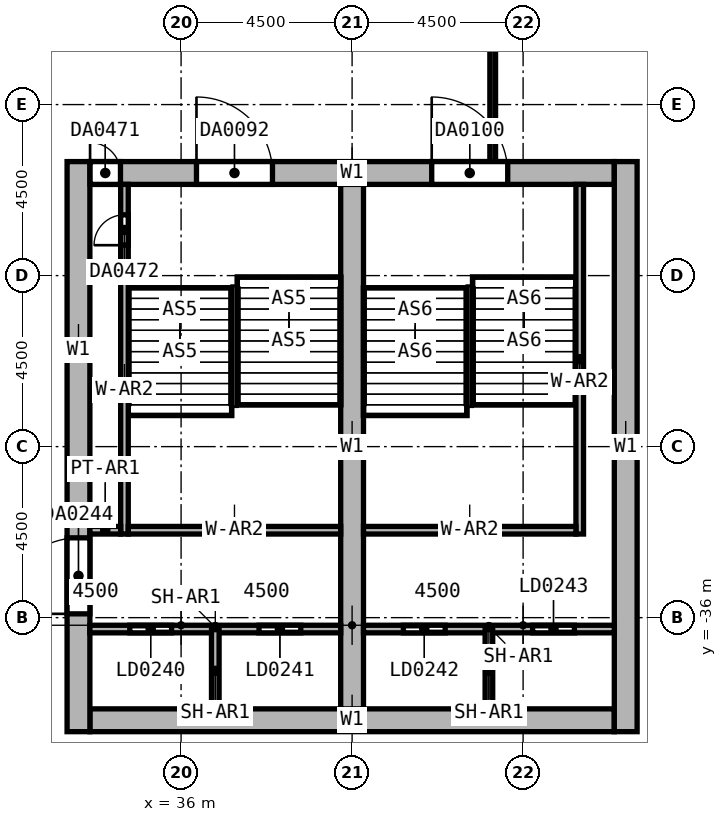
"""IFC4 building model, lengths in metres.
Left out: names, types, materials, properties, quantities, classifications, styles, units other than length and angle.
Written with IfcOpenShell. Run it as: python <this file> out.ifc"""

import sys

from ifc_helpers import new_model, si_unit, direction, frame, frame_2d, origin, place, context, subcontext, project, spatial, rectangle, extrude, element, fill, save


model = new_model("IFC4")
c1 = context("Model", 3, precision=1e-05, world=origin(), true_north=direction((0.0, 1.0)))
c2 = subcontext(c1, "Body", "Model", "MODEL_VIEW")
j1 = project(units=[si_unit("LENGTHUNIT", "METRE"), si_unit("PLANEANGLEUNIT", "RADIAN")], contexts=[c1])
p1 = place(None, origin())
s1 = spatial("IfcSite", under=j1, at=p1, CompositionType="ELEMENT")
p2 = place(p1, origin())
s2 = spatial("IfcBuilding", under=s1, at=p2, CompositionType="ELEMENT")
p3 = place(p2, frame((0.0, 0.0, 52.0)))
s3 = spatial("IfcBuildingStorey", under=s2, at=p3, CompositionType="ELEMENT", Elevation=52.0)
p4 = place(p3, frame((33.6, -24.3, 0.0), z_axis=(0.0, 0.0, 1.0), x_axis=(1.0, 0.0, 0.0)))
e1 = element("IfcWall", 1, at=p4, inside=s3, PredefinedType="SHEAR", context=c2, shape_type="SweptSolid", body=[
    extrude(rectangle(XDim=13.8, YDim=0.6, at=frame_2d((6.9, 0.0))), origin(), (0.0, 0.0, 1.0), 8.0),
])
p5 = place(p4, frame((2.805, 0.0, 0.0)))
e2 = element("IfcOpeningElement", 2, at=p5, cuts=e1, PredefinedType="OPENING", context=c2, shape_type="SweptSolid", body=[
    extrude(rectangle(XDim=2.0, YDim=2.4, at=frame_2d((1.0, 1.2))), frame((0.0, 0.3, 0.0), z_axis=(0.0, -1.0, 0.0), x_axis=(1.0, 0.0, 0.0)), (0.0, 0.0, 1.0), 0.6),
])
p6 = place(p4, frame((8.995, 0.0, 0.0)))
e3 = element("IfcOpeningElement", 3, at=p6, cuts=e1, PredefinedType="OPENING", context=c2, shape_type="SweptSolid", body=[
    extrude(rectangle(XDim=2.0, YDim=2.4, at=frame_2d((1.0, 1.2))), frame((0.0, 0.3, 0.0), z_axis=(0.0, -1.0, 0.0), x_axis=(1.0, 0.0, 0.0)), (0.0, 0.0, 1.0), 0.6),
])
p7 = place(p4, frame((0.005, 0.0, 0.0)))
e4 = element("IfcOpeningElement", 4, at=p7, cuts=e1, PredefinedType="OPENING", context=c2, shape_type="SweptSolid", body=[
    extrude(rectangle(XDim=0.8, YDim=2.1, at=frame_2d((0.4, 1.05))), frame((0.0, 0.3, 0.0), z_axis=(0.0, -1.0, 0.0), x_axis=(1.0, 0.0, 0.0)), (0.0, 0.0, 1.0), 0.6),
])
p8 = place(p3, frame((33.6, -38.7, 0.0), z_axis=(0.0, 0.0, 1.0), x_axis=(1.0, 0.0, 0.0)))
e5 = element("IfcWall", 5, at=p8, inside=s3, PredefinedType="SHEAR", context=c2, shape_type="SweptSolid", body=[
    extrude(rectangle(XDim=13.8, YDim=0.6, at=frame_2d((6.9, 0.0))), origin(), (0.0, 0.0, 1.0), 8.0),
])
p9 = place(p3, frame((33.3, -39.0, 0.0), z_axis=(0.0, 0.0, 1.0), x_axis=(0.0, 1.0, 0.0)))
e6 = element("IfcWall", 6, at=p9, inside=s3, PredefinedType="SHEAR", context=c2, shape_type="SweptSolid", body=[
    extrude(rectangle(XDim=15.0, YDim=0.6, at=frame_2d((7.5, 0.0))), origin(), (0.0, 0.0, 1.0), 8.0),
])
p10 = place(p9, frame((3.1, 0.0, 0.0)))
e7 = element("IfcOpeningElement", 7, at=p10, cuts=e6, PredefinedType="OPENING", context=c2, shape_type="SweptSolid", body=[
    extrude(rectangle(XDim=2.0, YDim=2.4, at=frame_2d((1.0, 1.2))), frame((0.0, 0.3, 0.0), z_axis=(0.0, -1.0, 0.0), x_axis=(1.0, 0.0, 0.0)), (0.0, 0.0, 1.0), 0.6),
])
p11 = place(p3, frame((47.7, -39.0, 0.0), z_axis=(0.0, 0.0, 1.0), x_axis=(0.0, 1.0, 0.0)))
e8 = element("IfcWall", 8, at=p11, inside=s3, PredefinedType="SHEAR", context=c2, shape_type="SweptSolid", body=[
    extrude(rectangle(XDim=15.0, YDim=0.6, at=frame_2d((7.5, 0.0))), origin(), (0.0, 0.0, 1.0), 8.0),
])
p12 = place(p3, frame((40.5, -38.4, 0.0), z_axis=(0.0, 0.0, 1.0), x_axis=(0.0, 1.0, 0.0)))
e9 = element("IfcWall", 9, at=p12, inside=s3, PredefinedType="SHEAR", context=c2, shape_type="SweptSolid", body=[
    extrude(rectangle(XDim=13.8, YDim=0.6, at=frame_2d((6.9, 0.0))), origin(), (0.0, 0.0, 1.0), 8.0),
])
p13 = place(p3, frame((34.51, -33.8, 0.0), z_axis=(0.0, 0.0, 1.0), x_axis=(0.0, 1.0, 0.0)))
e10 = element("IfcWall", 10, at=p13, inside=s3, PredefinedType="SOLIDWALL", context=c2, shape_type="SweptSolid", body=[
    extrude(rectangle(XDim=9.2, YDim=0.2, at=frame_2d((4.6, 0.0))), origin(), (0.0, 0.0, 1.0), 8.0),
])
p14 = place(p13, frame((7.6, 0.0, 0.0)))
e11 = element("IfcOpeningElement", 11, at=p14, cuts=e10, PredefinedType="OPENING", context=c2, shape_type="SweptSolid", body=[
    extrude(rectangle(XDim=0.8, YDim=2.1, at=frame_2d((0.4, 1.05))), frame((0.0, 0.1, 0.0), z_axis=(0.0, -1.0, 0.0), x_axis=(1.0, 0.0, 0.0)), (0.0, 0.0, 1.0), 0.2),
])
p15 = place(p3, frame((34.61, -33.7, 0.0), z_axis=(0.0, 0.0, 1.0), x_axis=(1.0, 0.0, 0.0)))
e12 = element("IfcWall", 12, at=p15, inside=s3, PredefinedType="SOLIDWALL", context=c2, shape_type="SweptSolid", body=[
    extrude(rectangle(XDim=5.59, YDim=0.2, at=frame_2d((2.795, 0.0))), origin(), (0.0, 0.0, 1.0), 8.0),
])
p16 = place(p3, frame((46.49, -33.8, 0.0), z_axis=(0.0, 0.0, 1.0), x_axis=(0.0, 1.0, 0.0)))
e13 = element("IfcWall", 13, at=p16, inside=s3, PredefinedType="SOLIDWALL", context=c2, shape_type="SweptSolid", body=[
    extrude(rectangle(XDim=9.2, YDim=0.2, at=frame_2d((4.6, 0.0))), origin(), (0.0, 0.0, 1.0), 8.0),
])
p17 = place(p3, frame((40.8, -33.7, 0.0), z_axis=(0.0, 0.0, 1.0), x_axis=(1.0, 0.0, 0.0)))
e14 = element("IfcWall", 14, at=p17, inside=s3, PredefinedType="SOLIDWALL", context=c2, shape_type="SweptSolid", body=[
    extrude(rectangle(XDim=5.59, YDim=0.2, at=frame_2d((2.795, 0.0))), origin(), (0.0, 0.0, 1.0), 8.0),
])
p18 = place(p3, frame((33.6, -36.3, 0.0), z_axis=(0.0, 0.0, 1.0), x_axis=(1.0, 0.0, 0.0)))
e15 = element("IfcWall", 15, at=p18, inside=s3, PredefinedType="SHEAR", context=c2, shape_type="SweptSolid", body=[
    extrude(rectangle(XDim=6.6, YDim=0.2, at=frame_2d((3.3, 0.0))), origin(), (0.0, 0.0, 1.0), 8.0),
])
p19 = place(p18, frame((1.05, 0.0, 0.0)))
e16 = element("IfcOpeningElement", 16, at=p19, cuts=e15, PredefinedType="OPENING", context=c2, shape_type="SweptSolid", body=[
    extrude(rectangle(XDim=1.1, YDim=2.4, at=frame_2d((0.55, 1.2))), frame((0.0, 0.1, 0.0), z_axis=(0.0, -1.0, 0.0), x_axis=(1.0, 0.0, 0.0)), (0.0, 0.0, 1.0), 0.2),
])
p20 = place(p18, frame((4.45, 0.0, 0.0)))
e17 = element("IfcOpeningElement", 17, at=p20, cuts=e15, PredefinedType="OPENING", context=c2, shape_type="SweptSolid", body=[
    extrude(rectangle(XDim=1.1, YDim=2.4, at=frame_2d((0.55, 1.2))), frame((0.0, 0.1, 0.0), z_axis=(0.0, -1.0, 0.0), x_axis=(1.0, 0.0, 0.0)), (0.0, 0.0, 1.0), 0.2),
])
p21 = place(p3, frame((40.8, -36.3, 0.0), z_axis=(0.0, 0.0, 1.0), x_axis=(1.0, 0.0, 0.0)))
e18 = element("IfcWall", 18, at=p21, inside=s3, PredefinedType="SHEAR", context=c2, shape_type="SweptSolid", body=[
    extrude(rectangle(XDim=6.6, YDim=0.2, at=frame_2d((3.3, 0.0))), origin(), (0.0, 0.0, 1.0), 8.0),
])
p22 = place(p21, frame((1.05, 0.0, 0.0)))
e19 = element("IfcOpeningElement", 19, at=p22, cuts=e18, PredefinedType="OPENING", context=c2, shape_type="SweptSolid", body=[
    extrude(rectangle(XDim=1.1, YDim=2.4, at=frame_2d((0.55, 1.2))), frame((0.0, 0.1, 0.0), z_axis=(0.0, -1.0, 0.0), x_axis=(1.0, 0.0, 0.0)), (0.0, 0.0, 1.0), 0.2),
])
p23 = place(p21, frame((4.45, 0.0, 0.0)))
e20 = element("IfcOpeningElement", 20, at=p23, cuts=e18, PredefinedType="OPENING", context=c2, shape_type="SweptSolid", body=[
    extrude(rectangle(XDim=1.1, YDim=2.4, at=frame_2d((0.55, 1.2))), frame((0.0, 0.1, 0.0), z_axis=(0.0, -1.0, 0.0), x_axis=(1.0, 0.0, 0.0)), (0.0, 0.0, 1.0), 0.2),
])
for number, where, z_axis, x_axis in (
    (21, (36.9, -38.4, 0.0), (0.0, 0.0, 1.0), (0.0, 1.0, 0.0)),
    (22, (44.1, -38.4, 0.0), (0.0, 0.0, 1.0), (0.0, 1.0, 0.0)),
):
    element("IfcWall", number, at=place(p3, frame(where, z_axis=z_axis, x_axis=x_axis)), inside=s3, PredefinedType="SHEAR", context=c2, shape_type="SweptSolid", body=[
        extrude(rectangle(XDim=2.1, YDim=0.2, at=frame_2d((1.05, 0.0))), origin(), (0.0, 0.0, 1.0), 8.0),
    ])
p24 = place(p3, frame((33.6, -33.7, 0.0), z_axis=(0.0, 0.0, 1.0), x_axis=(1.0, 0.0, 0.0)))
e23 = element("IfcWall", 23, at=p24, inside=s3, PredefinedType="PARTITIONING", context=c2, shape_type="SweptSolid", body=[
    extrude(rectangle(XDim=0.81, YDim=0.2, at=frame_2d((0.405, 0.0))), origin(), (0.0, 0.0, 1.0), 8.0),
])
p25 = place(p3, frame((44.2, -24.0, 0.0), z_axis=(0.0, 0.0, 1.0), x_axis=(0.0, 1.0, 0.0)))
e24 = element("IfcWall", 24, at=p25, inside=s3, PredefinedType="SOLIDWALL", context=c2, shape_type="SweptSolid", body=[
    extrude(rectangle(XDim=9.0, YDim=0.15, at=frame_2d((4.5, 0.0))), origin(), (0.0, 0.0, 1.0), 7.7),
])
p26 = place(p5, frame((2.0, 0.0, 0.0), z_axis=(0.0, 0.0, 1.0), x_axis=(-1.0, 0.0, 0.0)))
e25 = element("IfcDoor", 25, at=p26, inside=s3, OperationType="DOUBLE_DOOR_SINGLE_SWING", PredefinedType="DOOR", context=c2, shape_type="SweptSolid", body=[
    extrude(rectangle(XDim=2.0, YDim=2.4, at=frame_2d((1.0, 1.2))), frame((0.0, 0.025, 0.0), z_axis=(0.0, -1.0, 0.0), x_axis=(1.0, 0.0, 0.0)), (0.0, 0.0, 1.0), 0.05),
])
fill(e2, e25)
p27 = place(p6, frame((2.0, 0.0, 0.0), z_axis=(0.0, 0.0, 1.0), x_axis=(-1.0, 0.0, 0.0)))
e26 = element("IfcDoor", 26, at=p27, inside=s3, OperationType="DOUBLE_DOOR_SINGLE_SWING", PredefinedType="DOOR", context=c2, shape_type="SweptSolid", body=[
    extrude(rectangle(XDim=2.0, YDim=2.4, at=frame_2d((1.0, 1.2))), frame((0.0, 0.025, 0.0), z_axis=(0.0, -1.0, 0.0), x_axis=(1.0, 0.0, 0.0)), (0.0, 0.0, 1.0), 0.05),
])
fill(e3, e26)
p28 = place(p19, frame((1.1, 0.0, 0.0), z_axis=(0.0, 0.0, 1.0), x_axis=(-1.0, 0.0, 0.0)))
e27 = element("IfcDoor", 27, at=p28, inside=s3, OperationType="DOUBLE_DOOR_SLIDING", PredefinedType="DOOR", context=c2, shape_type="SweptSolid", body=[
    extrude(rectangle(XDim=1.1, YDim=2.4, at=frame_2d((0.55, 1.2))), frame((0.0, 0.025, 0.0), z_axis=(0.0, -1.0, 0.0), x_axis=(1.0, 0.0, 0.0)), (0.0, 0.0, 1.0), 0.05),
])
fill(e16, e27)
p29 = place(p20, frame((1.1, 0.0, 0.0), z_axis=(0.0, 0.0, 1.0), x_axis=(-1.0, 0.0, 0.0)))
e28 = element("IfcDoor", 28, at=p29, inside=s3, OperationType="DOUBLE_DOOR_SLIDING", PredefinedType="DOOR", context=c2, shape_type="SweptSolid", body=[
    extrude(rectangle(XDim=1.1, YDim=2.4, at=frame_2d((0.55, 1.2))), frame((0.0, 0.025, 0.0), z_axis=(0.0, -1.0, 0.0), x_axis=(1.0, 0.0, 0.0)), (0.0, 0.0, 1.0), 0.05),
])
fill(e17, e28)
p30 = place(p22, frame((1.1, 0.0, 0.0), z_axis=(0.0, 0.0, 1.0), x_axis=(-1.0, 0.0, 0.0)))
e29 = element("IfcDoor", 29, at=p30, inside=s3, OperationType="DOUBLE_DOOR_SLIDING", PredefinedType="DOOR", context=c2, shape_type="SweptSolid", body=[
    extrude(rectangle(XDim=1.1, YDim=2.4, at=frame_2d((0.55, 1.2))), frame((0.0, 0.025, 0.0), z_axis=(0.0, -1.0, 0.0), x_axis=(1.0, 0.0, 0.0)), (0.0, 0.0, 1.0), 0.05),
])
fill(e19, e29)
p31 = place(p23, frame((1.1, 0.0, 0.0), z_axis=(0.0, 0.0, 1.0), x_axis=(-1.0, 0.0, 0.0)))
e30 = element("IfcDoor", 30, at=p31, inside=s3, OperationType="DOUBLE_DOOR_SLIDING", PredefinedType="DOOR", context=c2, shape_type="SweptSolid", body=[
    extrude(rectangle(XDim=1.1, YDim=2.4, at=frame_2d((0.55, 1.2))), frame((0.0, 0.025, 0.0), z_axis=(0.0, -1.0, 0.0), x_axis=(1.0, 0.0, 0.0)), (0.0, 0.0, 1.0), 0.05),
])
fill(e20, e30)
p32 = place(p10, origin())
e31 = element("IfcDoor", 31, at=p32, inside=s3, OperationType="DOUBLE_DOOR_SINGLE_SWING", PredefinedType="DOOR", context=c2, shape_type="SweptSolid", body=[
    extrude(rectangle(XDim=2.0, YDim=2.4, at=frame_2d((1.0, 1.2))), frame((0.0, 0.025, 0.0), z_axis=(0.0, -1.0, 0.0), x_axis=(1.0, 0.0, 0.0)), (0.0, 0.0, 1.0), 0.05),
])
fill(e7, e31)
p33 = place(p7, origin())
e32 = element("IfcDoor", 32, at=p33, inside=s3, OperationType="SINGLE_SWING_LEFT", PredefinedType="DOOR", context=c2, shape_type="SweptSolid", body=[
    extrude(rectangle(XDim=0.8, YDim=2.1, at=frame_2d((0.4, 1.05))), frame((0.0, 0.025, 0.0), z_axis=(0.0, -1.0, 0.0), x_axis=(1.0, 0.0, 0.0)), (0.0, 0.0, 1.0), 0.05),
])
fill(e4, e32)
p34 = place(p14, origin())
e33 = element("IfcDoor", 33, at=p34, inside=s3, OperationType="SINGLE_SWING_LEFT", PredefinedType="DOOR", context=c2, shape_type="SweptSolid", body=[
    extrude(rectangle(XDim=0.8, YDim=2.1, at=frame_2d((0.4, 1.05))), frame((0.0, 0.025, 0.0), z_axis=(0.0, -1.0, 0.0), x_axis=(1.0, 0.0, 0.0)), (0.0, 0.0, 1.0), 0.05),
])
fill(e11, e33)
save(model, sys.argv[1])
